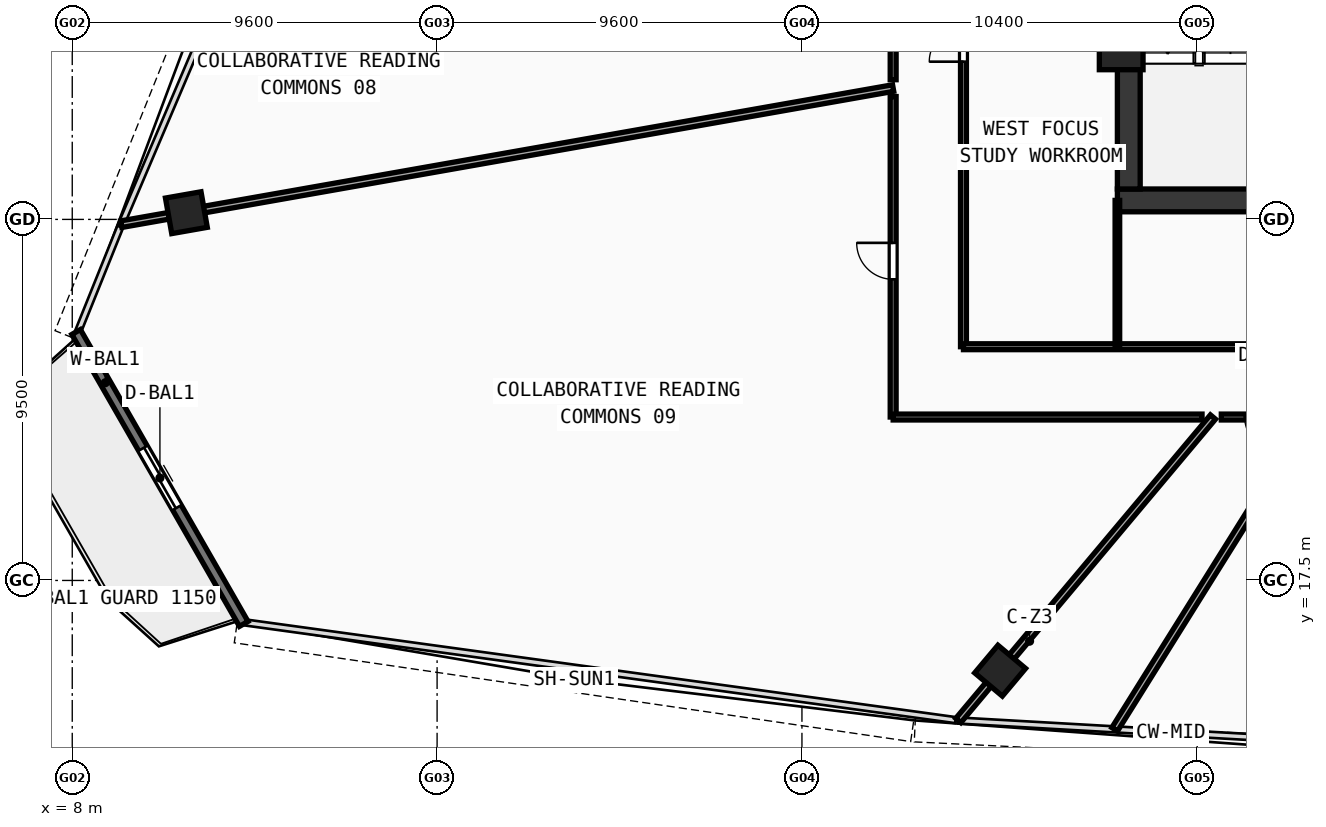
"""IFC4 building model, lengths in metres.
Left out: names, types, materials, properties, quantities, classifications, styles, units other than length and angle.
Written with IfcOpenShell. Run it as: python <this file> out.ifc"""

import sys

from ifc_helpers import new_model, si_unit, direction, frame, frame_2d, origin, origin_with_axes, origin_2d, place, context, subcontext, project, spatial, rectangle, hollow_rectangle, extrude, source, transform, mapped, element, fill, save


model = new_model("IFC4")
c1 = context("Model", 3, precision=1e-05, world=origin(), true_north=direction((0.0, 1.0)))
c2 = subcontext(c1, "Body", "Model", "MODEL_VIEW")
j1 = project(units=[si_unit("LENGTHUNIT", "METRE"), si_unit("PLANEANGLEUNIT", "RADIAN")], contexts=[c1])
p1 = place(None, origin())
s1 = spatial("IfcSite", under=j1, at=p1, CompositionType="ELEMENT")
p2 = place(p1, origin())
s2 = spatial("IfcBuilding", under=s1, at=p2, CompositionType="ELEMENT")
p3 = place(p2, frame((0.0, 0.0, 144.55)))
s3 = spatial("IfcBuildingStorey", under=s2, at=p3, CompositionType="ELEMENT", Elevation=144.55)
p4 = place(p3, frame((35.5, 27.5, 0.0), z_axis=(0.0, 0.0, 1.0), x_axis=(1.0, 0.0, 0.0)))
e1 = element("IfcWall", 1, at=p4, inside=s3, PredefinedType="SHEAR", context=c2, shape_type="SweptSolid", body=[
    extrude(rectangle(XDim=25.0, YDim=0.6, at=frame_2d((12.5, 0.0))), origin(), (0.0, 0.0, 1.0), 3.42),
])
p5 = place(p3, frame((35.8, 27.8, 0.0), z_axis=(0.0, 0.0, 1.0), x_axis=(0.0, 1.0, 0.0)))
e2 = element("IfcWall", 2, at=p5, inside=s3, PredefinedType="SHEAR", context=c2, shape_type="SweptSolid", body=[
    extrude(rectangle(XDim=12.1, YDim=0.6, at=frame_2d((6.05, 0.0))), origin(), (0.0, 0.0, 1.0), 3.42),
])
m1 = source(origin(), c2, "Body", "SweptSolid", [
    extrude(hollow_rectangle(XDim=1.15, YDim=1.15, WallThickness=0.048, at=origin_2d()), origin(), (0.0, 0.0, 1.0), 3.68),
])
p6 = place(p3, frame((35.6, 31.513, -0.26), z_axis=(0.0, 0.0, 1.0), x_axis=(1.0, 0.0, 0.0)))
e3 = element("IfcColumn", 3, at=p6, inside=s3, PredefinedType="COLUMN", context=c2, shape_type="MappedRepresentation", body=[
    mapped(m1, transform((0.0, 0.0, 0.0), scale=1.0)),
])
m2 = source(origin(), c2, "Body", "SweptSolid", [
    extrude(hollow_rectangle(XDim=0.95, YDim=0.95, WallThickness=0.04, at=origin_2d()), origin(), (0.0, 0.0, 1.0), 3.68),
])
for number, where, z_axis, x_axis in (
    (4, (32.415, 15.126, -0.26), (0.0, 0.0, 1.0), (0.766, -0.643, 0.0)),
    (5, (11.003, 27.177, -0.26), (0.0, 0.0, 1.0), (0.174, -0.985, 0.0)),
):
    element("IfcColumn", number, at=place(p3, frame(where, z_axis=z_axis, x_axis=x_axis)), inside=s3, PredefinedType="COLUMN", context=c2, shape_type="MappedRepresentation", body=[
        mapped(m2, transform((0.0, 0.0, 0.0), scale=1.0)),
    ])
p7 = place(p3, frame((8.102, 24.038, 0.0), z_axis=(0.0, 0.0, 1.0), x_axis=(0.497915888941, -0.867225326856, 0.0)))
e6 = element("IfcWall", 6, at=p7, inside=s3, PredefinedType="STANDARD", context=c2, shape_type="SweptSolid", body=[
    extrude(rectangle(XDim=8.858, YDim=0.26, at=frame_2d((4.429, 0.0))), origin(), (0.0, 0.0, 1.0), 3.42),
])
p8 = place(p7, frame((3.529, 0.0, 0.0)))
e7 = element("IfcOpeningElement", 7, at=p8, cuts=e6, PredefinedType="OPENING", context=c2, shape_type="SweptSolid", body=[
    extrude(rectangle(XDim=1.8, YDim=2.15, at=frame_2d((0.9, 1.075))), frame((0.0, 0.14, 0.0), z_axis=(0.0, -1.0, 0.0), x_axis=(1.0, 0.0, 0.0)), (0.0, 0.0, 1.0), 0.28),
])
p9 = place(p3, frame((31.45, 23.65, 0.0), z_axis=(0.0, 0.0, 1.0), x_axis=(0.0, 1.0, 0.0)))
e8 = element("IfcWall", 8, at=p9, inside=s3, PredefinedType="PARTITIONING", context=c2, shape_type="SweptSolid", body=[
    extrude(rectangle(XDim=16.6, YDim=0.155, at=frame_2d((8.3, 0.0))), origin(), (0.0, 0.0, 1.0), 2.77),
])
p10 = place(p9, frame((7.5, 0.0, 0.0)))
e9 = element("IfcOpeningElement", 9, at=p10, cuts=e8, PredefinedType="OPENING", context=c2, shape_type="SweptSolid", body=[
    extrude(rectangle(XDim=0.9, YDim=2.08, at=frame_2d((0.45, 1.04))), frame((0.0, 0.087, 0.0), z_axis=(0.0, -1.0, 0.0), x_axis=(1.0, 0.0, 0.0)), (0.0, 0.0, 1.0), 0.175),
])
p11 = place(p3, frame((31.45, 23.65, 0.0), z_axis=(0.0, 0.0, 1.0), x_axis=(1.0, 0.0, 0.0)))
e10 = element("IfcWall", 10, at=p11, inside=s3, PredefinedType="PARTITIONING", context=c2, shape_type="SweptSolid", body=[
    extrude(rectangle(XDim=33.1, YDim=0.155, at=frame_2d((16.55, 0.0))), origin(), (0.0, 0.0, 1.0), 2.77),
])
p12 = place(p11, frame((16.0, 0.0, 0.0)))
e11 = element("IfcOpeningElement", 11, at=p12, cuts=e10, PredefinedType="OPENING", context=c2, shape_type="SweptSolid", body=[
    extrude(rectangle(XDim=0.92, YDim=2.1, at=frame_2d((0.46, 1.05))), frame((0.0, 0.087, 0.0), z_axis=(0.0, -1.0, 0.0), x_axis=(1.0, 0.0, 0.0)), (0.0, 0.0, 1.0), 0.175),
])
p13 = place(p3, frame((35.5, 23.65, 0.0), z_axis=(0.0, 0.0, 1.0), x_axis=(0.0, 1.0, 0.0)))
e12 = element("IfcWall", 12, at=p13, inside=s3, PredefinedType="PARTITIONING", context=c2, shape_type="SweptSolid", body=[
    extrude(rectangle(XDim=3.85, YDim=0.12, at=frame_2d((1.925, 0.0))), origin(), (0.0, 0.0, 1.0), 3.02),
])
p14 = place(p3, frame((29.6, 30.456, 0.0), z_axis=(0.0, 0.0, 1.0), x_axis=(-0.984807623882, -0.173648909998, 0.0)))
e13 = element("IfcWall", 13, at=p14, inside=s3, PredefinedType="PARTITIONING", context=c2, shape_type="SweptSolid", body=[
    extrude(rectangle(XDim=20.622, YDim=0.175, at=frame_2d((10.311, 0.0))), origin(), (0.0, 0.0, 1.0), 2.77),
])
p15 = place(p3, frame((38.015, 21.8, 0.0), z_axis=(0.0, 0.0, 1.0), x_axis=(-0.642781677101, -0.76604942111, 0.0)))
e14 = element("IfcWall", 14, at=p15, inside=s3, PredefinedType="PARTITIONING", context=c2, shape_type="SweptSolid", body=[
    extrude(rectangle(XDim=10.424, YDim=0.175, at=frame_2d((5.212, 0.0))), origin(), (0.0, 0.0, 1.0), 2.77),
])
p16 = place(p3, frame((40.564, 21.8, 0.0), z_axis=(0.0, 0.0, 1.0), x_axis=(-0.529931002604, -0.848040761096, 0.0)))
e15 = element("IfcWall", 15, at=p16, inside=s3, PredefinedType="PARTITIONING", context=c2, shape_type="SweptSolid", body=[
    extrude(rectangle(XDim=9.691, YDim=0.175, at=frame_2d((4.845, 0.0))), origin(), (0.0, 0.0, 1.0), 2.77),
])
p17 = place(p3, frame((29.6, 21.8, 0.0), z_axis=(0.0, 0.0, 1.0), x_axis=(0.0, 1.0, 0.0)))
e16 = element("IfcWall", 16, at=p17, inside=s3, PredefinedType="PARTITIONING", context=c2, shape_type="SweptSolid", body=[
    extrude(rectangle(XDim=8.432, YDim=0.155, at=frame_2d((4.216, 0.0))), origin(), (0.0, 0.0, 1.0), 3.02),
])
p18 = place(p17, frame((3.623, 0.0, 0.0)))
e17 = element("IfcOpeningElement", 17, at=p18, cuts=e16, PredefinedType="OPENING", context=c2, shape_type="SweptSolid", body=[
    extrude(rectangle(XDim=0.96, YDim=2.12, at=frame_2d((0.48, 1.06))), frame((0.0, 0.087, 0.0), z_axis=(0.0, -1.0, 0.0), x_axis=(1.0, 0.0, 0.0)), (0.0, 0.0, 1.0), 0.175),
])
p19 = place(p3, frame((29.6, 30.675, 0.0), z_axis=(0.0, 0.0, 1.0), x_axis=(0.0, 1.0, 0.0)))
e18 = element("IfcWall", 18, at=p19, inside=s3, PredefinedType="PARTITIONING", context=c2, shape_type="SweptSolid", body=[
    extrude(rectangle(XDim=2.805, YDim=0.155, at=frame_2d((1.402, 0.0))), origin(), (0.0, 0.0, 1.0), 3.42),
])
p20 = place(p19, frame((0.927, 0.0, 0.0)))
e19 = element("IfcOpeningElement", 19, at=p20, cuts=e18, PredefinedType="OPENING", context=c2, shape_type="SweptSolid", body=[
    extrude(rectangle(XDim=0.96, YDim=2.12, at=frame_2d((0.48, 1.06))), frame((0.0, 0.087, 0.0), z_axis=(0.0, -1.0, 0.0), x_axis=(1.0, 0.0, 0.0)), (0.0, 0.0, 1.0), 0.175),
])
p21 = place(p3, frame((40.305, 21.8, 0.0), z_axis=(0.0, 0.0, 1.0), x_axis=(-1.0, 0.0, 0.0)))
e20 = element("IfcWall", 20, at=p21, inside=s3, PredefinedType="PARTITIONING", context=c2, shape_type="SweptSolid", body=[
    extrude(rectangle(XDim=2.07, YDim=0.155, at=frame_2d((1.035, 0.0))), origin(), (0.0, 0.0, 1.0), 2.77),
])
p22 = place(p21, frame((0.555, 0.0, 0.0)))
e21 = element("IfcOpeningElement", 21, at=p22, cuts=e20, PredefinedType="OPENING", context=c2, shape_type="SweptSolid", body=[
    extrude(rectangle(XDim=0.9, YDim=2.08, at=frame_2d((0.45, 1.04))), frame((0.0, 0.087, 0.0), z_axis=(0.0, -1.0, 0.0), x_axis=(1.0, 0.0, 0.0)), (0.0, 0.0, 1.0), 0.175),
])
p23 = place(p3, frame((37.728, 21.8, 0.0), z_axis=(0.0, 0.0, 1.0), x_axis=(-1.0, 0.0, 0.0)))
e22 = element("IfcWall", 22, at=p23, inside=s3, PredefinedType="PARTITIONING", context=c2, shape_type="SweptSolid", body=[
    extrude(rectangle(XDim=8.127, YDim=0.155, at=frame_2d((4.064, 0.0))), origin(), (0.0, 0.0, 1.0), 3.02),
])
m3 = source(origin(), c2, "Body", "SweptSolid", [
    extrude(rectangle(XDim=1.8, YDim=2.15, at=frame_2d((0.9, 1.075))), frame((0.0, 0.025, 0.0), z_axis=(0.0, -1.0, 0.0), x_axis=(1.0, 0.0, 0.0)), (0.0, 0.0, 1.0), 0.05),
])
p24 = place(p8, origin_with_axes())
e23 = element("IfcDoor", 23, at=p24, inside=s3, OperationType="DOUBLE_DOOR_SLIDING", PredefinedType="DOOR", context=c2, shape_type="MappedRepresentation", body=[
    mapped(m3, transform((0.0, 0.0, 0.0), scale=1.0)),
])
fill(e7, e23)
m4 = source(origin(), c2, "Body", "SweptSolid", [
    extrude(rectangle(XDim=0.9, YDim=2.08, at=frame_2d((0.45, 1.04))), frame((0.0, 0.025, 0.0), z_axis=(0.0, -1.0, 0.0), x_axis=(1.0, 0.0, 0.0)), (0.0, 0.0, 1.0), 0.05),
])
p25 = place(p10, origin_with_axes())
e24 = element("IfcDoor", 24, at=p25, inside=s3, OperationType="SINGLE_SWING_LEFT", PredefinedType="DOOR", context=c2, shape_type="MappedRepresentation", body=[
    mapped(m4, transform((0.0, 0.0, 0.0), scale=1.0)),
])
fill(e9, e24)
m5 = source(origin(), c2, "Body", "SweptSolid", [
    extrude(rectangle(XDim=0.96, YDim=2.12, at=frame_2d((0.48, 1.06))), frame((0.0, 0.025, 0.0), z_axis=(0.0, -1.0, 0.0), x_axis=(1.0, 0.0, 0.0)), (0.0, 0.0, 1.0), 0.05),
])
p26 = place(p18, origin_with_axes())
e25 = element("IfcDoor", 25, at=p26, inside=s3, OperationType="SINGLE_SWING_RIGHT", PredefinedType="DOOR", context=c2, shape_type="MappedRepresentation", body=[
    mapped(m5, transform((0.0, 0.0, 0.0), scale=1.0)),
])
fill(e17, e25)
p27 = place(p22, origin_with_axes())
e26 = element("IfcDoor", 26, at=p27, inside=s3, OperationType="SINGLE_SWING_LEFT", PredefinedType="DOOR", context=c2, shape_type="MappedRepresentation", body=[
    mapped(m4, transform((0.0, 0.0, 0.0), scale=1.0)),
])
fill(e21, e26)
save(model, sys.argv[1])
